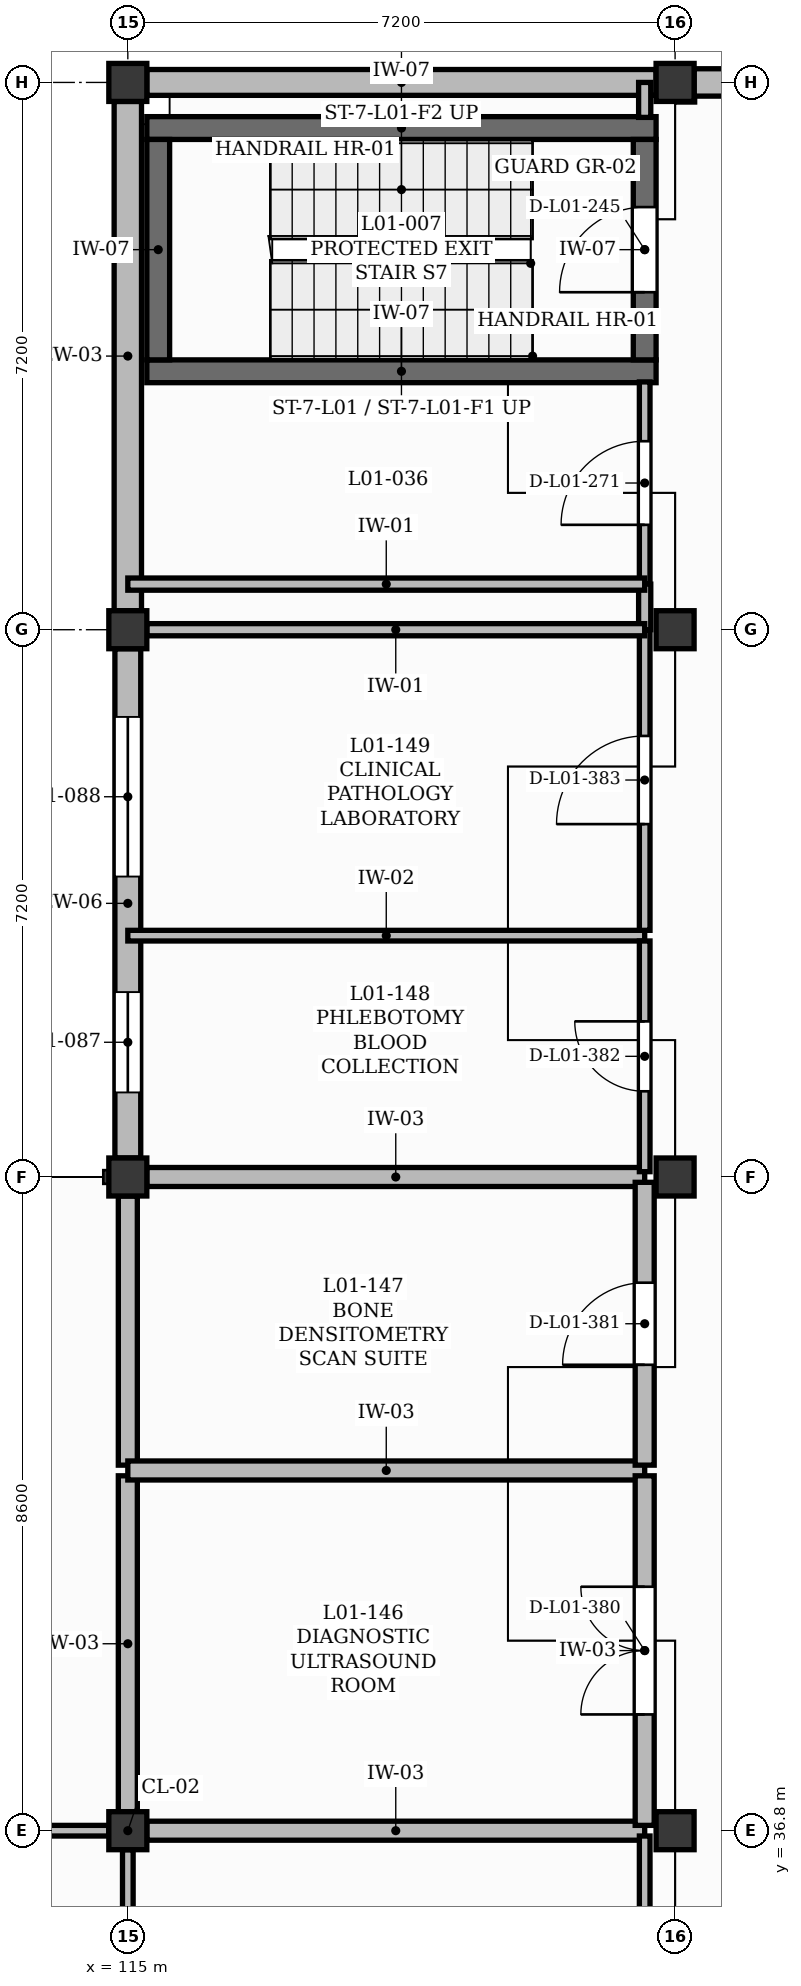
"""IFC4 building model, lengths in metres.
Left out: names, types, materials, properties, quantities, classifications, styles, units other than length and angle.
Written with IfcOpenShell. Run it as: python <this file> out.ifc"""

import sys

from ifc_helpers import new_model, si_unit, direction, frame, frame_2d, origin, origin_2d, place, context, subcontext, project, spatial, rectangle, extrude, element, fill, save


model = new_model("IFC4")
c1 = context("Model", 3, precision=1e-05, world=origin(), true_north=direction((0.0, 1.0)))
c2 = subcontext(c1, "Body", "Model", "MODEL_VIEW")
j1 = project(units=[si_unit("LENGTHUNIT", "METRE"), si_unit("PLANEANGLEUNIT", "RADIAN")], contexts=[c1])
p1 = place(None, origin())
s1 = spatial("IfcSite", under=j1, at=p1, CompositionType="ELEMENT")
p2 = place(p1, origin())
s2 = spatial("IfcBuilding", under=s1, at=p2, CompositionType="ELEMENT")
p3 = place(p2, frame((0.0, 0.0, 4.5)))
s3 = spatial("IfcBuildingStorey", under=s2, at=p3, CompositionType="ELEMENT", Elevation=4.5)
for number, where, z_axis, x_axis in (
    (1, (115.0, 36.8, 0.0), (0.0, 0.0, 1.0), (1.0, 0.0, 0.0)),
    (2, (115.0, 45.4, 0.0), (0.0, 0.0, 1.0), (1.0, 0.0, 0.0)),
    (3, (115.0, 52.6, 0.0), (0.0, 0.0, 1.0), (1.0, 0.0, 0.0)),
    (4, (115.0, 59.8, 0.0), (0.0, 0.0, 1.0), (1.0, 0.0, 0.0)),
    (5, (122.2, 36.8, 0.0), (0.0, 0.0, 1.0), (1.0, 0.0, 0.0)),
    (6, (122.2, 45.4, 0.0), (0.0, 0.0, 1.0), (1.0, 0.0, 0.0)),
    (7, (122.2, 52.6, 0.0), (0.0, 0.0, 1.0), (1.0, 0.0, 0.0)),
    (8, (122.2, 59.8, 0.0), (0.0, 0.0, 1.0), (1.0, 0.0, 0.0)),
):
    element("IfcColumn", number, at=place(p3, frame(where, z_axis=z_axis, x_axis=x_axis)), inside=s3, PredefinedType="COLUMN", context=c2, shape_type="SweptSolid", body=[
        extrude(rectangle(XDim=0.5, YDim=0.5, at=origin_2d()), origin(), (0.0, 0.0, 1.0), 4.22),
    ])
p4 = place(p3, frame((115.0, 45.65, 0.0), z_axis=(0.0, 0.0, 1.0), x_axis=(0.0, 1.0, 0.0)))
e9 = element("IfcWall", 9, at=p4, inside=s3, PredefinedType="SOLIDWALL", context=c2, shape_type="SweptSolid", body=[
    extrude(rectangle(XDim=6.7, YDim=0.34, at=frame_2d((3.35, 0.0))), origin(), (0.0, 0.0, 1.0), 3.52),
])
p5 = place(p4, frame((0.863, 0.0, 1.5)))
e10 = element("IfcOpeningElement", 10, at=p5, cuts=e9, PredefinedType="OPENING", context=c2, shape_type="SweptSolid", body=[
    extrude(rectangle(XDim=1.32, YDim=1.25, at=frame_2d((0.66, 0.625))), frame((0.0, 0.18, 0.0), z_axis=(0.0, -1.0, 0.0), x_axis=(1.0, 0.0, 0.0)), (0.0, 0.0, 1.0), 0.36),
])
p6 = place(p4, frame((3.703, 0.0, 1.05)))
e11 = element("IfcOpeningElement", 11, at=p6, cuts=e9, PredefinedType="OPENING", context=c2, shape_type="SweptSolid", body=[
    extrude(rectangle(XDim=2.1, YDim=1.65, at=frame_2d((1.05, 0.825))), frame((0.0, 0.18, 0.0), z_axis=(0.0, -1.0, 0.0), x_axis=(1.0, 0.0, 0.0)), (0.0, 0.0, 1.0), 0.36),
])
p7 = place(p3, frame((115.25, 59.8, 0.0), z_axis=(0.0, 0.0, 1.0), x_axis=(1.0, 0.0, 0.0)))
e12 = element("IfcWall", 12, at=p7, inside=s3, PredefinedType="SOLIDWALL", context=c2, shape_type="SweptSolid", body=[
    extrude(rectangle(XDim=6.7, YDim=0.34, at=frame_2d((3.35, 0.0))), origin(), (0.0, 0.0, 1.0), 3.52),
])
p8 = place(p3, frame((115.0, 52.85, 0.0), z_axis=(0.0, 0.0, 1.0), x_axis=(0.0, 1.0, 0.0)))
e13 = element("IfcWall", 13, at=p8, inside=s3, PredefinedType="SOLIDWALL", context=c2, shape_type="SweptSolid", body=[
    extrude(rectangle(XDim=6.7, YDim=0.36, at=frame_2d((3.35, 0.0))), origin(), (0.0, 0.0, 1.0), 3.52),
])
p9 = place(p3, frame((122.45, 59.8, 0.0), z_axis=(0.0, 0.0, 1.0), x_axis=(1.0, 0.0, 0.0)))
e14 = element("IfcWall", 14, at=p9, inside=s3, PredefinedType="SOLIDWALL", context=c2, shape_type="SweptSolid", body=[
    extrude(rectangle(XDim=5.9, YDim=0.36, at=frame_2d((2.95, 0.0))), origin(), (0.0, 0.0, 1.0), 3.52),
])
p10 = place(p9, frame((3.305, 0.0, 1.5)))
e15 = element("IfcOpeningElement", 15, at=p10, cuts=e14, PredefinedType="OPENING", context=c2, shape_type="SweptSolid", body=[
    extrude(rectangle(XDim=1.32, YDim=1.25, at=frame_2d((0.66, 0.625))), frame((0.0, 0.19, 0.0), z_axis=(0.0, -1.0, 0.0), x_axis=(1.0, 0.0, 0.0)), (0.0, 0.0, 1.0), 0.38),
])
for number, where, z_axis, x_axis in (
    (16, (115.25, 56.0, 0.0), (0.0, 0.0, 1.0), (1.0, 0.0, 0.0)),
    (17, (115.25, 59.2, 0.0), (0.0, 0.0, 1.0), (1.0, 0.0, 0.0)),
):
    element("IfcWall", number, at=place(p3, frame(where, z_axis=z_axis, x_axis=x_axis)), inside=s3, PredefinedType="SHEAR", context=c2, shape_type="SweptSolid", body=[
        extrude(rectangle(XDim=6.7, YDim=0.3, at=frame_2d((3.35, 0.0))), origin(), (0.0, 0.0, 1.0), 4.25),
    ])
p11 = place(p3, frame((115.4, 56.15, 0.0), z_axis=(0.0, 0.0, 1.0), x_axis=(0.0, 1.0, 0.0)))
e18 = element("IfcWall", 18, at=p11, inside=s3, PredefinedType="SHEAR", context=c2, shape_type="SweptSolid", body=[
    extrude(rectangle(XDim=2.9, YDim=0.3, at=frame_2d((1.45, 0.0))), origin(), (0.0, 0.0, 1.0), 4.25),
])
p12 = place(p3, frame((121.8, 56.15, 0.0), z_axis=(0.0, 0.0, 1.0), x_axis=(0.0, 1.0, 0.0)))
e19 = element("IfcWall", 19, at=p12, inside=s3, PredefinedType="SHEAR", context=c2, shape_type="SweptSolid", body=[
    extrude(rectangle(XDim=2.9, YDim=0.3, at=frame_2d((1.45, 0.0))), origin(), (0.0, 0.0, 1.0), 4.25),
])
p13 = place(p12, frame((0.89, 0.0, 0.0)))
e20 = element("IfcOpeningElement", 20, at=p13, cuts=e19, PredefinedType="OPENING", context=c2, shape_type="SweptSolid", body=[
    extrude(rectangle(XDim=1.12, YDim=2.1, at=frame_2d((0.56, 1.05))), frame((0.0, 0.16, 0.0), z_axis=(0.0, -1.0, 0.0), x_axis=(1.0, 0.0, 0.0)), (0.0, 0.0, 1.0), 0.32),
])
p14 = place(p3, frame((110.6, 36.8, 0.0), z_axis=(0.0, 0.0, 1.0), x_axis=(1.0, 0.0, 0.0)))
e21 = element("IfcWall", 21, at=p14, inside=s3, PredefinedType="PARTITIONING", context=c2, shape_type="SweptSolid", body=[
    extrude(rectangle(XDim=4.15, YDim=0.14, at=frame_2d((2.075, 0.0))), origin(), (0.0, 0.0, 1.0), 3.87),
])
p15 = place(p3, frame((115.0, 30.428, 0.0), z_axis=(0.0, 0.0, 1.0), x_axis=(0.0, 1.0, 0.0)))
e22 = element("IfcWall", 22, at=p15, inside=s3, PredefinedType="PARTITIONING", context=c2, shape_type="SweptSolid", body=[
    extrude(rectangle(XDim=6.122, YDim=0.14, at=frame_2d((3.061, 0.0))), origin(), (0.0, 0.0, 1.0), 3.52),
])
p16 = place(p15, frame((2.161, 0.0, 0.0)))
e23 = element("IfcOpeningElement", 23, at=p16, cuts=e22, PredefinedType="OPENING", context=c2, shape_type="SweptSolid", body=[
    extrude(rectangle(XDim=1.8, YDim=2.3, at=frame_2d((0.9, 1.15))), frame((0.0, 0.08, 0.0), z_axis=(0.0, -1.0, 0.0), x_axis=(1.0, 0.0, 0.0)), (0.0, 0.0, 1.0), 0.16),
])
p17 = place(p3, frame((115.0, 37.05, 0.0), z_axis=(0.0, 0.0, 1.0), x_axis=(0.0, 1.0, 0.0)))
e24 = element("IfcWall", 24, at=p17, inside=s3, PredefinedType="SOLIDWALL", context=c2, shape_type="SweptSolid", body=[
    extrude(rectangle(XDim=4.419, YDim=0.25, at=frame_2d((2.209, 0.0))), origin(), (0.0, 0.0, 1.0), 3.52),
])
p18 = place(p3, frame((115.25, 36.8, 0.0), z_axis=(0.0, 0.0, 1.0), x_axis=(1.0, 0.0, 0.0)))
e25 = element("IfcWall", 25, at=p18, inside=s3, PredefinedType="SOLIDWALL", context=c2, shape_type="SweptSolid", body=[
    extrude(rectangle(XDim=6.55, YDim=0.25, at=frame_2d((3.275, 0.0))), origin(), (0.0, 0.0, 1.0), 3.52),
])
p19 = place(p3, frame((115.0, 41.609, 0.0), z_axis=(0.0, 0.0, 1.0), x_axis=(0.0, 1.0, 0.0)))
e26 = element("IfcWall", 26, at=p19, inside=s3, PredefinedType="SOLIDWALL", context=c2, shape_type="SweptSolid", body=[
    extrude(rectangle(XDim=3.541, YDim=0.25, at=frame_2d((1.771, 0.0))), origin(), (0.0, 0.0, 1.0), 3.52),
])
p20 = place(p3, frame((115.0, 41.539, 0.0), z_axis=(0.0, 0.0, 1.0), x_axis=(1.0, 0.0, 0.0)))
e27 = element("IfcWall", 27, at=p20, inside=s3, PredefinedType="SOLIDWALL", context=c2, shape_type="SweptSolid", body=[
    extrude(rectangle(XDim=6.8, YDim=0.25, at=frame_2d((3.4, 0.0))), origin(), (0.0, 0.0, 1.0), 4.18),
])
p21 = place(p3, frame((115.25, 45.4, 0.0), z_axis=(0.0, 0.0, 1.0), x_axis=(1.0, 0.0, 0.0)))
e28 = element("IfcWall", 28, at=p21, inside=s3, PredefinedType="SOLIDWALL", context=c2, shape_type="SweptSolid", body=[
    extrude(rectangle(XDim=6.55, YDim=0.25, at=frame_2d((3.275, 0.0))), origin(), (0.0, 0.0, 1.0), 3.52),
])
p22 = place(p3, frame((115.0, 48.575, 0.0), z_axis=(0.0, 0.0, 1.0), x_axis=(1.0, 0.0, 0.0)))
e29 = element("IfcWall", 29, at=p22, inside=s3, PredefinedType="PARTITIONING", context=c2, shape_type="SweptSolid", body=[
    extrude(rectangle(XDim=6.8, YDim=0.14, at=frame_2d((3.4, 0.0))), origin(), (0.0, 0.0, 1.0), 4.18),
])
p23 = place(p3, frame((121.8, 30.428, 0.0), z_axis=(0.0, 0.0, 1.0), x_axis=(0.0, 1.0, 0.0)))
e30 = element("IfcWall", 30, at=p23, inside=s3, PredefinedType="PARTITIONING", context=c2, shape_type="SweptSolid", body=[
    extrude(rectangle(XDim=6.302, YDim=0.14, at=frame_2d((3.151, 0.0))), origin(), (0.0, 0.0, 1.0), 4.18),
])
p24 = place(p3, frame((121.8, 36.87, 0.0), z_axis=(0.0, 0.0, 1.0), x_axis=(0.0, 1.0, 0.0)))
e31 = element("IfcWall", 31, at=p24, inside=s3, PredefinedType="SOLIDWALL", context=c2, shape_type="SweptSolid", body=[
    extrude(rectangle(XDim=4.599, YDim=0.25, at=frame_2d((2.299, 0.0))), origin(), (0.0, 0.0, 1.0), 4.18),
])
p25 = place(p24, frame((1.459, 0.0, 0.0)))
e32 = element("IfcOpeningElement", 32, at=p25, cuts=e31, PredefinedType="OPENING", context=c2, shape_type="SweptSolid", body=[
    extrude(rectangle(XDim=1.68, YDim=2.3, at=frame_2d((0.84, 1.15))), frame((0.0, 0.135, 0.0), z_axis=(0.0, -1.0, 0.0), x_axis=(1.0, 0.0, 0.0)), (0.0, 0.0, 1.0), 0.27),
])
p26 = place(p3, frame((121.8, 41.609, 0.0), z_axis=(0.0, 0.0, 1.0), x_axis=(0.0, 1.0, 0.0)))
e33 = element("IfcWall", 33, at=p26, inside=s3, PredefinedType="SOLIDWALL", context=c2, shape_type="SweptSolid", body=[
    extrude(rectangle(XDim=3.721, YDim=0.25, at=frame_2d((1.861, 0.0))), origin(), (0.0, 0.0, 1.0), 4.18),
])
p27 = place(p26, frame((1.321, 0.0, 0.0)))
e34 = element("IfcOpeningElement", 34, at=p27, cuts=e33, PredefinedType="OPENING", context=c2, shape_type="SweptSolid", body=[
    extrude(rectangle(XDim=1.08, YDim=2.15, at=frame_2d((0.54, 1.075))), frame((0.0, 0.135, 0.0), z_axis=(0.0, -1.0, 0.0), x_axis=(1.0, 0.0, 0.0)), (0.0, 0.0, 1.0), 0.27),
])
p28 = place(p3, frame((121.8, 45.47, 0.0), z_axis=(0.0, 0.0, 1.0), x_axis=(0.0, 1.0, 0.0)))
e35 = element("IfcWall", 35, at=p28, inside=s3, PredefinedType="PARTITIONING", context=c2, shape_type="SweptSolid", body=[
    extrude(rectangle(XDim=3.035, YDim=0.14, at=frame_2d((1.518, 0.0))), origin(), (0.0, 0.0, 1.0), 4.18),
])
p29 = place(p28, frame((1.058, 0.0, 0.0)))
e36 = element("IfcOpeningElement", 36, at=p29, cuts=e35, PredefinedType="OPENING", context=c2, shape_type="SweptSolid", body=[
    extrude(rectangle(XDim=0.92, YDim=2.1, at=frame_2d((0.46, 1.05))), frame((0.0, 0.08, 0.0), z_axis=(0.0, -1.0, 0.0), x_axis=(1.0, 0.0, 0.0)), (0.0, 0.0, 1.0), 0.16),
])
p30 = place(p3, frame((121.8, 48.645, 0.0), z_axis=(0.0, 0.0, 1.0), x_axis=(0.0, 1.0, 0.0)))
e37 = element("IfcWall", 37, at=p30, inside=s3, PredefinedType="PARTITIONING", context=c2, shape_type="SweptSolid", body=[
    extrude(rectangle(XDim=3.955, YDim=0.14, at=frame_2d((1.978, 0.0))), origin(), (0.0, 0.0, 1.0), 4.18),
])
p31 = place(p30, frame((1.397, 0.0, 0.0)))
e38 = element("IfcOpeningElement", 38, at=p31, cuts=e37, PredefinedType="OPENING", context=c2, shape_type="SweptSolid", body=[
    extrude(rectangle(XDim=1.16, YDim=2.1, at=frame_2d((0.58, 1.05))), frame((0.0, 0.08, 0.0), z_axis=(0.0, -1.0, 0.0), x_axis=(1.0, 0.0, 0.0)), (0.0, 0.0, 1.0), 0.16),
])
p32 = place(p3, frame((121.8, 53.2, 0.0), z_axis=(0.0, 0.0, 1.0), x_axis=(0.0, 1.0, 0.0)))
e39 = element("IfcWall", 39, at=p32, inside=s3, PredefinedType="PARTITIONING", context=c2, shape_type="SweptSolid", body=[
    extrude(rectangle(XDim=2.66, YDim=0.14, at=frame_2d((1.33, 0.0))), origin(), (0.0, 0.0, 1.0), 4.18),
])
p33 = place(p32, frame((0.78, 0.0, 0.0)))
e40 = element("IfcOpeningElement", 40, at=p33, cuts=e39, PredefinedType="OPENING", context=c2, shape_type="SweptSolid", body=[
    extrude(rectangle(XDim=1.1, YDim=2.1, at=frame_2d((0.55, 1.05))), frame((0.0, 0.08, 0.0), z_axis=(0.0, -1.0, 0.0), x_axis=(1.0, 0.0, 0.0)), (0.0, 0.0, 1.0), 0.16),
])
p34 = place(p3, frame((121.8, 59.34, 0.0), z_axis=(0.0, 0.0, 1.0), x_axis=(0.0, 1.0, 0.0)))
e41 = element("IfcWall", 41, at=p34, inside=s3, PredefinedType="PARTITIONING", context=c2, shape_type="SweptSolid", body=[
    extrude(rectangle(XDim=0.46, YDim=0.16, at=frame_2d((0.23, 0.0))), origin(), (0.0, 0.0, 1.0), 4.18),
])
p35 = place(p3, frame((121.8, 52.6, 0.0), z_axis=(0.0, 0.0, 1.0), x_axis=(0.0, 1.0, 0.0)))
e42 = element("IfcWall", 42, at=p35, inside=s3, PredefinedType="PARTITIONING", context=c2, shape_type="SweptSolid", body=[
    extrude(rectangle(XDim=0.6, YDim=0.16, at=frame_2d((0.3, 0.0))), origin(), (0.0, 0.0, 1.0), 4.18),
])
p36 = place(p3, frame((115.0, 53.2, 0.0), z_axis=(0.0, 0.0, 1.0), x_axis=(1.0, 0.0, 0.0)))
e43 = element("IfcWall", 43, at=p36, inside=s3, PredefinedType="PARTITIONING", context=c2, shape_type="SweptSolid", body=[
    extrude(rectangle(XDim=6.8, YDim=0.16, at=frame_2d((3.4, 0.0))), origin(), (0.0, 0.0, 1.0), 4.18),
])
p37 = place(p3, frame((121.8, 52.6, 0.0), z_axis=(0.0, 0.0, 1.0), x_axis=(-1.0, 0.0, 0.0)))
e44 = element("IfcWall", 44, at=p37, inside=s3, PredefinedType="PARTITIONING", context=c2, shape_type="SweptSolid", body=[
    extrude(rectangle(XDim=6.55, YDim=0.16, at=frame_2d((3.275, 0.0))), origin(), (0.0, 0.0, 1.0), 3.52),
])
p38 = place(p5, origin())
e45 = element("IfcWindow", 45, at=p38, inside=s3, PartitioningType="SINGLE_PANEL", PredefinedType="WINDOW", context=c2, shape_type="SweptSolid", body=[
    extrude(rectangle(XDim=1.32, YDim=1.25, at=frame_2d((0.66, 0.625))), frame((0.0, 0.03, 0.0), z_axis=(0.0, -1.0, 0.0), x_axis=(1.0, 0.0, 0.0)), (0.0, 0.0, 1.0), 0.06),
])
fill(e10, e45)
p39 = place(p6, origin())
e46 = element("IfcWindow", 46, at=p39, inside=s3, PartitioningType="DOUBLE_PANEL_VERTICAL", PredefinedType="WINDOW", context=c2, shape_type="SweptSolid", body=[
    extrude(rectangle(XDim=2.1, YDim=1.65, at=frame_2d((1.05, 0.825))), frame((0.0, 0.03, 0.0), z_axis=(0.0, -1.0, 0.0), x_axis=(1.0, 0.0, 0.0)), (0.0, 0.0, 1.0), 0.06),
])
fill(e11, e46)
p40 = place(p13, origin())
e47 = element("IfcDoor", 47, at=p40, inside=s3, OperationType="SINGLE_SWING_LEFT", PredefinedType="DOOR", context=c2, shape_type="SweptSolid", body=[
    extrude(rectangle(XDim=1.12, YDim=2.1, at=frame_2d((0.56, 1.05))), frame((0.0, 0.025, 0.0), z_axis=(0.0, -1.0, 0.0), x_axis=(1.0, 0.0, 0.0)), (0.0, 0.0, 1.0), 0.05),
])
fill(e20, e47)
p41 = place(p33, origin())
e48 = element("IfcDoor", 48, at=p41, inside=s3, OperationType="SINGLE_SWING_LEFT", PredefinedType="DOOR", context=c2, shape_type="SweptSolid", body=[
    extrude(rectangle(XDim=1.1, YDim=2.1, at=frame_2d((0.55, 1.05))), frame((0.0, 0.025, 0.0), z_axis=(0.0, -1.0, 0.0), x_axis=(1.0, 0.0, 0.0)), (0.0, 0.0, 1.0), 0.05),
])
fill(e40, e48)
p42 = place(p25, origin())
e49 = element("IfcDoor", 49, at=p42, inside=s3, OperationType="DOUBLE_DOOR_SINGLE_SWING", PredefinedType="DOOR", context=c2, shape_type="SweptSolid", body=[
    extrude(rectangle(XDim=1.68, YDim=2.3, at=frame_2d((0.84, 1.15))), frame((0.0, 0.025, 0.0), z_axis=(0.0, -1.0, 0.0), x_axis=(1.0, 0.0, 0.0)), (0.0, 0.0, 1.0), 0.05),
])
fill(e32, e49)
p43 = place(p27, origin())
e50 = element("IfcDoor", 50, at=p43, inside=s3, OperationType="SINGLE_SWING_LEFT", PredefinedType="DOOR", context=c2, shape_type="SweptSolid", body=[
    extrude(rectangle(XDim=1.08, YDim=2.15, at=frame_2d((0.54, 1.075))), frame((0.0, 0.025, 0.0), z_axis=(0.0, -1.0, 0.0), x_axis=(1.0, 0.0, 0.0)), (0.0, 0.0, 1.0), 0.05),
])
fill(e34, e50)
p44 = place(p29, origin())
e51 = element("IfcDoor", 51, at=p44, inside=s3, OperationType="SINGLE_SWING_RIGHT", PredefinedType="DOOR", context=c2, shape_type="SweptSolid", body=[
    extrude(rectangle(XDim=0.92, YDim=2.1, at=frame_2d((0.46, 1.05))), frame((0.0, 0.025, 0.0), z_axis=(0.0, -1.0, 0.0), x_axis=(1.0, 0.0, 0.0)), (0.0, 0.0, 1.0), 0.05),
])
fill(e36, e51)
p45 = place(p31, origin())
e52 = element("IfcDoor", 52, at=p45, inside=s3, OperationType="SINGLE_SWING_LEFT", PredefinedType="DOOR", context=c2, shape_type="SweptSolid", body=[
    extrude(rectangle(XDim=1.16, YDim=2.1, at=frame_2d((0.58, 1.05))), frame((0.0, 0.025, 0.0), z_axis=(0.0, -1.0, 0.0), x_axis=(1.0, 0.0, 0.0)), (0.0, 0.0, 1.0), 0.05),
])
fill(e38, e52)
save(model, sys.argv[1])
